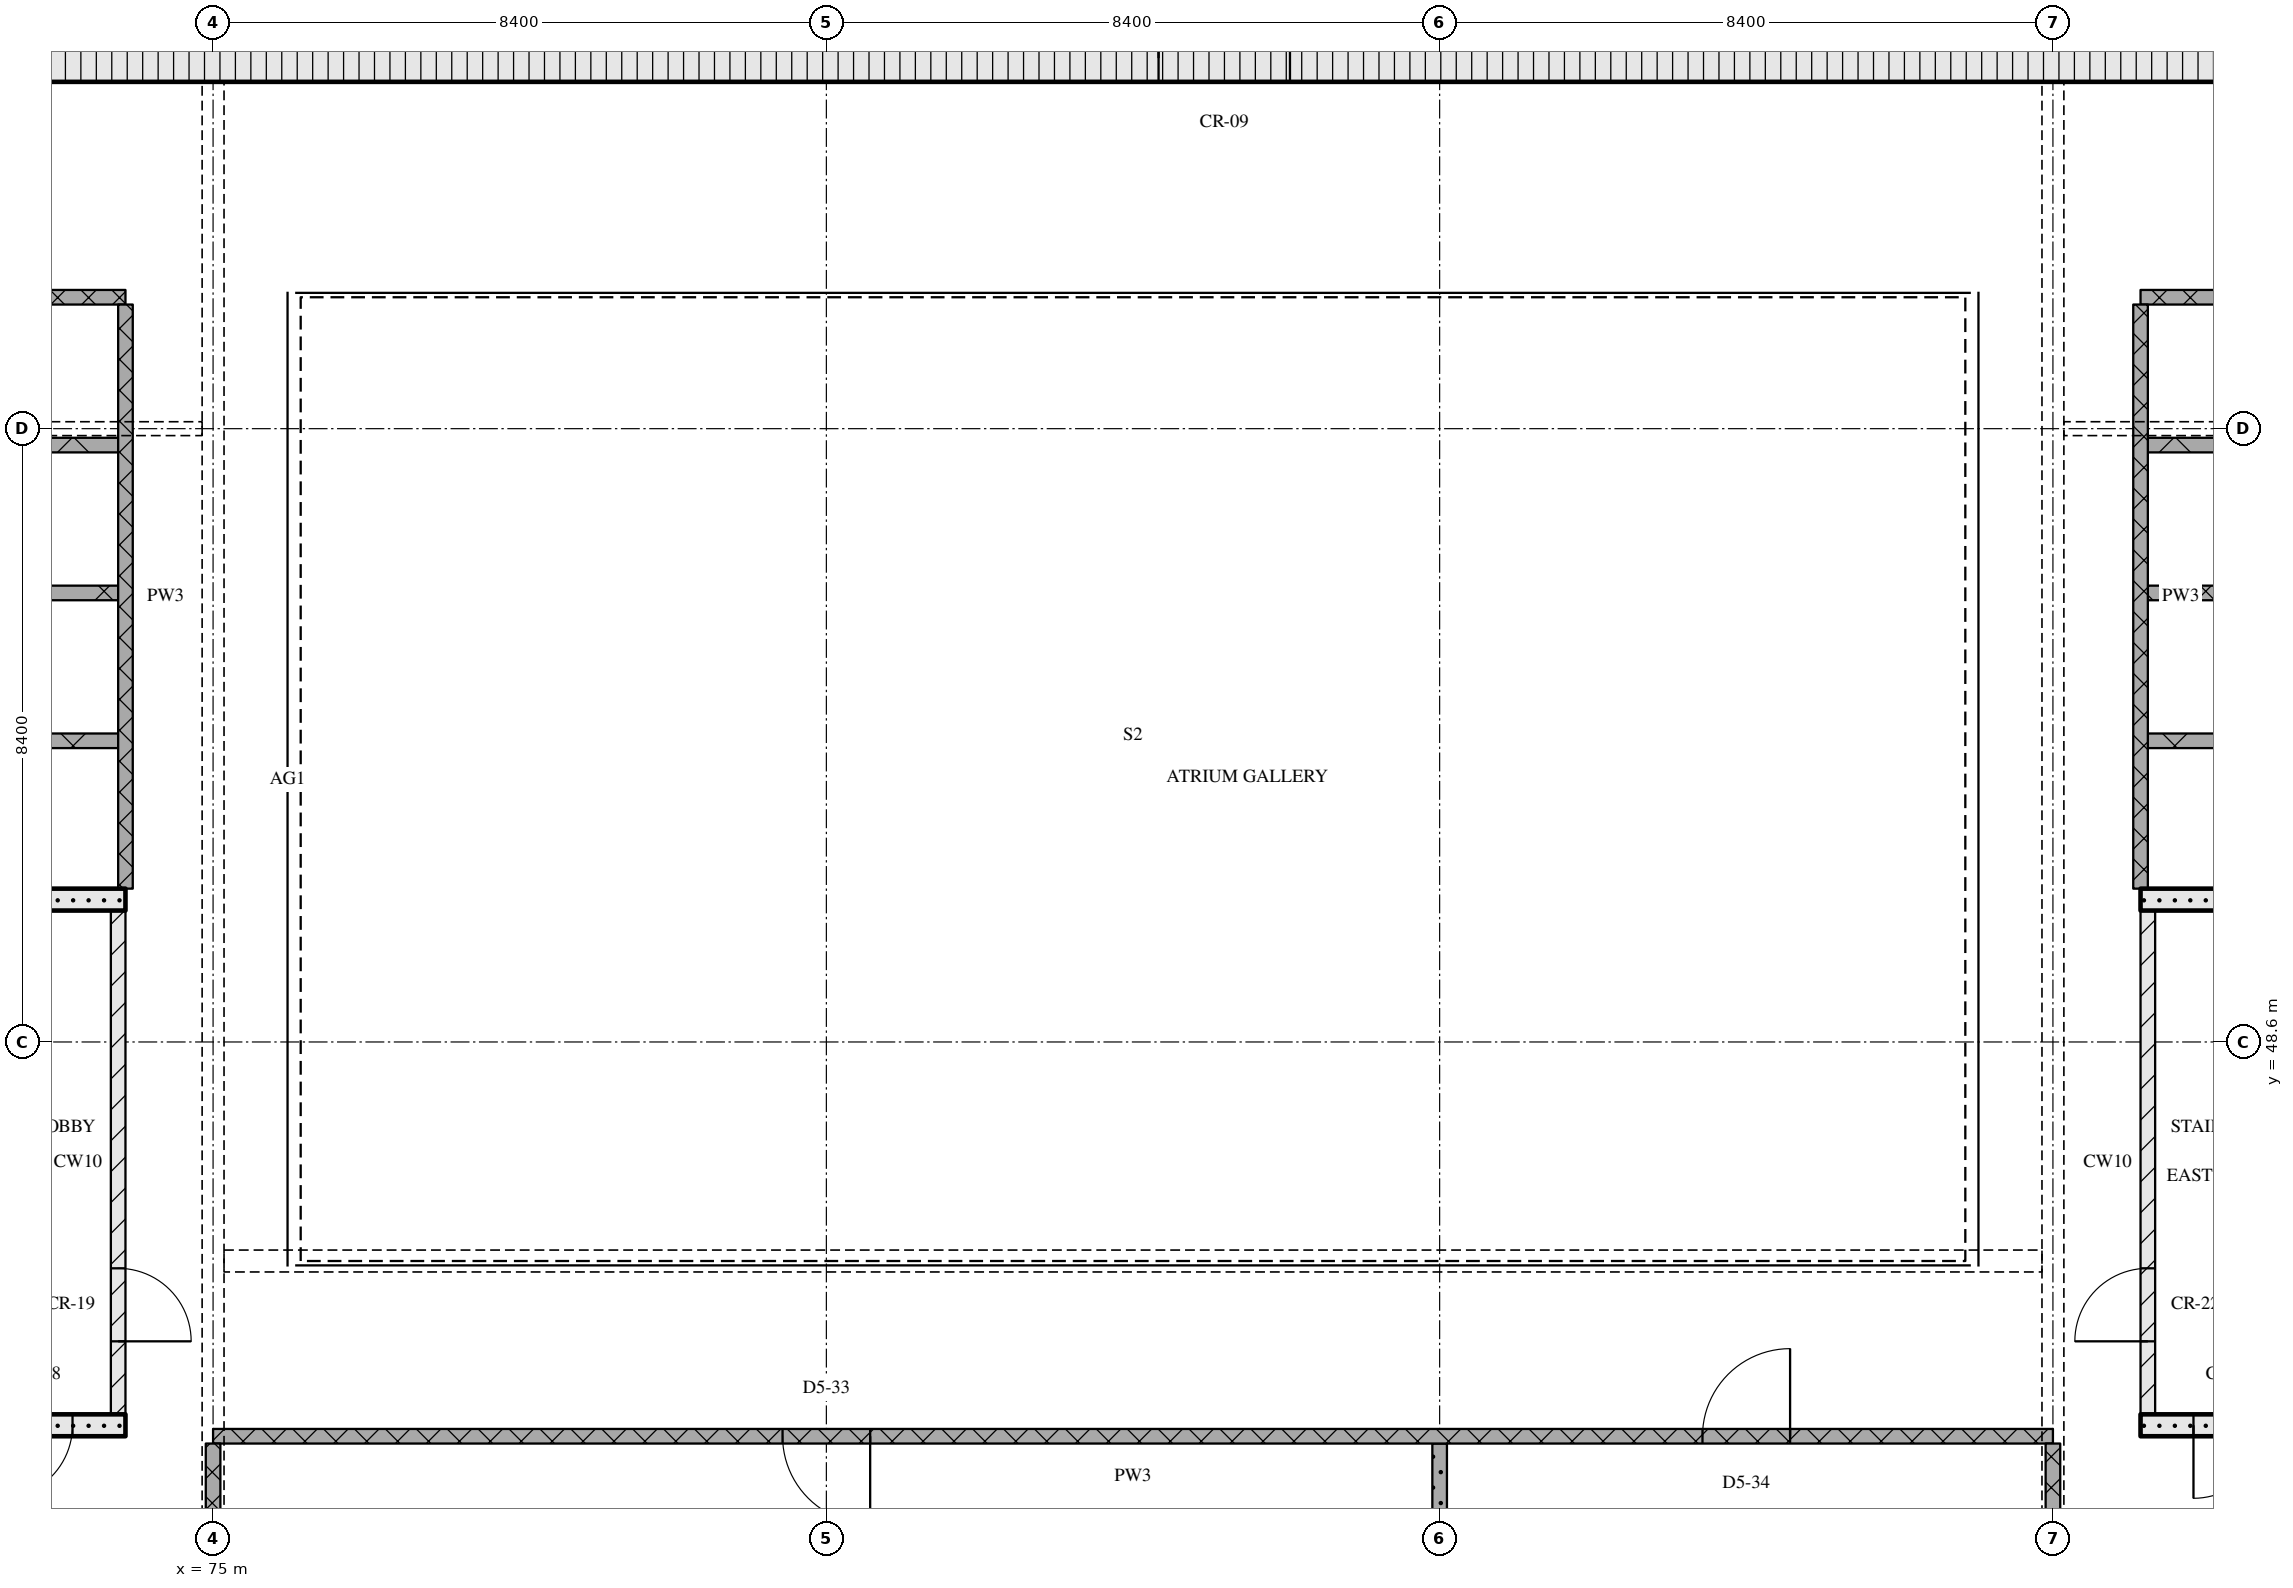
"""IFC4 building model, lengths in metres.
Left out: names, types, materials, properties, quantities, classifications, styles, units other than length and angle.
Written with IfcOpenShell. Run it as: python <this file> out.ifc"""

import sys

from ifc_helpers import new_model, si_unit, direction, frame, frame_2d, origin, place, context, subcontext, project, spatial, rectangle, extrude, element, fill, save


model = new_model("IFC4")
c1 = context("Model", 3, precision=1e-05, world=origin(), true_north=direction((0.0, 1.0)))
c2 = subcontext(c1, "Body", "Model", "MODEL_VIEW")
j1 = project(units=[si_unit("LENGTHUNIT", "METRE"), si_unit("PLANEANGLEUNIT", "RADIAN")], contexts=[c1])
p1 = place(None, origin())
s1 = spatial("IfcSite", under=j1, at=p1, CompositionType="ELEMENT")
p2 = place(p1, origin())
s2 = spatial("IfcBuilding", under=s1, at=p2, CompositionType="ELEMENT")
p3 = place(p2, frame((0.0, 0.0, 248.7)))
s3 = spatial("IfcBuildingStorey", under=s2, at=p3, CompositionType="ELEMENT", Elevation=248.7)
p4 = place(p3, frame((67.15, 62.075, 0.0), z_axis=(0.0, 0.0, 1.0), x_axis=(1.0, 0.0, 0.0)))
e1 = element("IfcWall", 1, at=p4, inside=s3, PredefinedType="SOLIDWALL", context=c2, shape_type="SweptSolid", body=[
    extrude(rectangle(XDim=40.9, YDim=0.65, at=frame_2d((20.45, 0.0))), origin(), (0.0, 0.0, 1.0), 3.3),
])
p5 = place(p4, frame((20.8, 0.0, 0.0)))
e2 = element("IfcOpeningElement", 2, at=p5, cuts=e1, PredefinedType="OPENING", context=c2, shape_type="SweptSolid", body=[
    extrude(rectangle(XDim=1.8, YDim=2.1, at=frame_2d((0.9, 1.05))), frame((0.0, 0.335, 0.0), z_axis=(0.0, -1.0, 0.0), x_axis=(1.0, 0.0, 0.0)), (0.0, 0.0, 1.0), 0.67),
])
p6 = place(p3, frame((68.2, 43.35, 0.0), z_axis=(0.0, 0.0, 1.0), x_axis=(1.0, 0.0, 0.0)))
e3 = element("IfcWall", 3, at=p6, inside=s3, PredefinedType="SOLIDWALL", context=c2, shape_type="SweptSolid", body=[
    extrude(rectangle(XDim=5.6, YDim=0.3, at=frame_2d((2.8, 0.0))), origin(), (0.0, 0.0, 1.0), 3.3),
])
p7 = place(p6, frame((3.875, 0.0, 0.0)))
e4 = element("IfcOpeningElement", 4, at=p7, cuts=e3, PredefinedType="OPENING", context=c2, shape_type="SweptSolid", body=[
    extrude(rectangle(XDim=1.0, YDim=2.1, at=frame_2d((0.5, 1.05))), frame((0.0, 0.16, 0.0), z_axis=(0.0, -1.0, 0.0), x_axis=(1.0, 0.0, 0.0)), (0.0, 0.0, 1.0), 0.32),
])
p8 = place(p3, frame((73.7, 43.5, 0.0), z_axis=(0.0, 0.0, 1.0), x_axis=(0.0, 1.0, 0.0)))
e5 = element("IfcWall", 5, at=p8, inside=s3, PredefinedType="PARTITIONING", context=c2, shape_type="SweptSolid", body=[
    extrude(rectangle(XDim=6.9, YDim=0.2, at=frame_2d((3.45, 0.0))), origin(), (0.0, 0.0, 1.0), 3.3),
])
p9 = place(p8, frame((1.0, 0.0, 0.0)))
e6 = element("IfcOpeningElement", 6, at=p9, cuts=e5, PredefinedType="OPENING", context=c2, shape_type="SweptSolid", body=[
    extrude(rectangle(XDim=1.0, YDim=2.1, at=frame_2d((0.5, 1.05))), frame((0.0, 0.11, 0.0), z_axis=(0.0, -1.0, 0.0), x_axis=(1.0, 0.0, 0.0)), (0.0, 0.0, 1.0), 0.22),
])
p10 = place(p3, frame((68.2, 50.55, 0.0), z_axis=(0.0, 0.0, 1.0), x_axis=(1.0, 0.0, 0.0)))
e7 = element("IfcWall", 7, at=p10, inside=s3, PredefinedType="SOLIDWALL", context=c2, shape_type="SweptSolid", body=[
    extrude(rectangle(XDim=5.6, YDim=0.3, at=frame_2d((2.8, 0.0))), origin(), (0.0, 0.0, 1.0), 3.3),
])
p11 = place(p3, frame((101.4, 43.35, 0.0), z_axis=(0.0, 0.0, 1.0), x_axis=(1.0, 0.0, 0.0)))
e8 = element("IfcWall", 8, at=p11, inside=s3, PredefinedType="SOLIDWALL", context=c2, shape_type="SweptSolid", body=[
    extrude(rectangle(XDim=5.6, YDim=0.3, at=frame_2d((2.8, 0.0))), origin(), (0.0, 0.0, 1.0), 3.3),
])
p12 = place(p11, frame((0.725, 0.0, 0.0)))
e9 = element("IfcOpeningElement", 9, at=p12, cuts=e8, PredefinedType="OPENING", context=c2, shape_type="SweptSolid", body=[
    extrude(rectangle(XDim=1.0, YDim=2.1, at=frame_2d((0.5, 1.05))), frame((0.0, 0.16, 0.0), z_axis=(0.0, -1.0, 0.0), x_axis=(1.0, 0.0, 0.0)), (0.0, 0.0, 1.0), 0.32),
])
p13 = place(p3, frame((101.5, 43.5, 0.0), z_axis=(0.0, 0.0, 1.0), x_axis=(0.0, 1.0, 0.0)))
e10 = element("IfcWall", 10, at=p13, inside=s3, PredefinedType="PARTITIONING", context=c2, shape_type="SweptSolid", body=[
    extrude(rectangle(XDim=6.9, YDim=0.2, at=frame_2d((3.45, 0.0))), origin(), (0.0, 0.0, 1.0), 3.3),
])
p14 = place(p13, frame((1.0, 0.0, 0.0)))
e11 = element("IfcOpeningElement", 11, at=p14, cuts=e10, PredefinedType="OPENING", context=c2, shape_type="SweptSolid", body=[
    extrude(rectangle(XDim=1.0, YDim=2.1, at=frame_2d((0.5, 1.05))), frame((0.0, 0.11, 0.0), z_axis=(0.0, -1.0, 0.0), x_axis=(1.0, 0.0, 0.0)), (0.0, 0.0, 1.0), 0.22),
])
p15 = place(p3, frame((101.4, 50.55, 0.0), z_axis=(0.0, 0.0, 1.0), x_axis=(1.0, 0.0, 0.0)))
e12 = element("IfcWall", 12, at=p15, inside=s3, PredefinedType="SOLIDWALL", context=c2, shape_type="SweptSolid", body=[
    extrude(rectangle(XDim=5.6, YDim=0.3, at=frame_2d((2.8, 0.0))), origin(), (0.0, 0.0, 1.0), 3.3),
])
p16 = place(p3, frame((100.2, 43.2, 0.0), z_axis=(0.0, 0.0, 1.0), x_axis=(-1.0, 0.0, 0.0)))
e13 = element("IfcWall", 13, at=p16, inside=s3, PredefinedType="PARTITIONING", context=c2, shape_type="SweptSolid", body=[
    extrude(rectangle(XDim=25.2, YDim=0.2, at=frame_2d((12.6, 0.0))), origin(), (0.0, 0.0, 1.0), 3.3),
])
p17 = place(p16, frame((3.6, 0.0, 0.0)))
e14 = element("IfcOpeningElement", 14, at=p17, cuts=e13, PredefinedType="OPENING", context=c2, shape_type="SweptSolid", body=[
    extrude(rectangle(XDim=1.2, YDim=2.1, at=frame_2d((0.6, 1.05))), frame((0.0, 0.11, 0.0), z_axis=(0.0, -1.0, 0.0), x_axis=(1.0, 0.0, 0.0)), (0.0, 0.0, 1.0), 0.22),
])
p18 = place(p16, frame((16.2, 0.0, 0.0)))
e15 = element("IfcOpeningElement", 15, at=p18, cuts=e13, PredefinedType="OPENING", context=c2, shape_type="SweptSolid", body=[
    extrude(rectangle(XDim=1.2, YDim=2.1, at=frame_2d((0.6, 1.05))), frame((0.0, 0.11, 0.0), z_axis=(0.0, -1.0, 0.0), x_axis=(1.0, 0.0, 0.0)), (0.0, 0.0, 1.0), 0.22),
])
p19 = place(p3, frame((63.1, 52.725, 0.0), z_axis=(0.0, 0.0, 1.0), x_axis=(1.0, 0.0, 0.0)))
e16 = element("IfcWall", 16, at=p19, inside=s3, PredefinedType="PARTITIONING", context=c2, shape_type="SweptSolid", body=[
    extrude(rectangle(XDim=10.6, YDim=0.2, at=frame_2d((5.3, 0.0))), origin(), (0.0, 0.0, 1.0), 3.3),
])
p20 = place(p3, frame((101.5, 52.725, 0.0), z_axis=(0.0, 0.0, 1.0), x_axis=(1.0, 0.0, 0.0)))
e17 = element("IfcWall", 17, at=p20, inside=s3, PredefinedType="PARTITIONING", context=c2, shape_type="SweptSolid", body=[
    extrude(rectangle(XDim=10.6, YDim=0.2, at=frame_2d((5.3, 0.0))), origin(), (0.0, 0.0, 1.0), 3.3),
])
p21 = place(p3, frame((63.1, 54.75, 0.0), z_axis=(0.0, 0.0, 1.0), x_axis=(1.0, 0.0, 0.0)))
e18 = element("IfcWall", 18, at=p21, inside=s3, PredefinedType="PARTITIONING", context=c2, shape_type="SweptSolid", body=[
    extrude(rectangle(XDim=10.6, YDim=0.2, at=frame_2d((5.3, 0.0))), origin(), (0.0, 0.0, 1.0), 3.3),
])
p22 = place(p3, frame((101.5, 54.75, 0.0), z_axis=(0.0, 0.0, 1.0), x_axis=(1.0, 0.0, 0.0)))
e19 = element("IfcWall", 19, at=p22, inside=s3, PredefinedType="PARTITIONING", context=c2, shape_type="SweptSolid", body=[
    extrude(rectangle(XDim=10.6, YDim=0.2, at=frame_2d((5.3, 0.0))), origin(), (0.0, 0.0, 1.0), 3.3),
])
for number, where, z_axis, x_axis in (
    (20, (66.92, 56.775, 0.0), (0.0, 0.0, 1.0), (1.0, 0.0, 0.0)),
    (21, (101.5, 56.775, 0.0), (0.0, 0.0, 1.0), (1.0, 0.0, 0.0)),
):
    element("IfcWall", number, at=place(p3, frame(where, z_axis=z_axis, x_axis=x_axis)), inside=s3, PredefinedType="PARTITIONING", context=c2, shape_type="SweptSolid", body=[
        extrude(rectangle(XDim=6.78, YDim=0.2, at=frame_2d((3.39, 0.0))), origin(), (0.0, 0.0, 1.0), 3.3),
    ])
p23 = place(p3, frame((73.8, 58.8, 0.0), z_axis=(0.0, 0.0, 1.0), x_axis=(-1.0, 0.0, 0.0)))
e22 = element("IfcWall", 22, at=p23, inside=s3, PredefinedType="PARTITIONING", context=c2, shape_type="SweptSolid", body=[
    extrude(rectangle(XDim=10.8, YDim=0.2, at=frame_2d((5.4, 0.0))), origin(), (0.0, 0.0, 1.0), 3.3),
])
p24 = place(p23, frame((4.95, 0.0, 0.0)))
e23 = element("IfcOpeningElement", 23, at=p24, cuts=e22, PredefinedType="OPENING", context=c2, shape_type="SweptSolid", body=[
    extrude(rectangle(XDim=0.9, YDim=2.1, at=frame_2d((0.45, 1.05))), frame((0.0, 0.11, 0.0), z_axis=(0.0, -1.0, 0.0), x_axis=(1.0, 0.0, 0.0)), (0.0, 0.0, 1.0), 0.22),
])
p25 = place(p3, frame((101.4, 58.8, 0.0), z_axis=(0.0, 0.0, 1.0), x_axis=(1.0, 0.0, 0.0)))
e24 = element("IfcWall", 24, at=p25, inside=s3, PredefinedType="PARTITIONING", context=c2, shape_type="SweptSolid", body=[
    extrude(rectangle(XDim=10.8, YDim=0.2, at=frame_2d((5.4, 0.0))), origin(), (0.0, 0.0, 1.0), 3.3),
])
p26 = place(p3, frame((73.8, 58.7, 0.0), z_axis=(0.0, 0.0, 1.0), x_axis=(0.0, -1.0, 0.0)))
e25 = element("IfcWall", 25, at=p26, inside=s3, PredefinedType="PARTITIONING", context=c2, shape_type="SweptSolid", body=[
    extrude(rectangle(XDim=8.0, YDim=0.2, at=frame_2d((4.0, 0.0))), origin(), (0.0, 0.0, 1.0), 3.3),
])
p27 = place(p3, frame((75.0, 43.1, 0.0), z_axis=(0.0, 0.0, 1.0), x_axis=(0.0, -1.0, 0.0)))
e26 = element("IfcWall", 26, at=p27, inside=s3, PredefinedType="PARTITIONING", context=c2, shape_type="SweptSolid", body=[
    extrude(rectangle(XDim=2.2, YDim=0.2, at=frame_2d((1.1, 0.0))), origin(), (0.0, 0.0, 1.0), 2.51),
])
p28 = place(p3, frame((91.8, 43.1, 0.0), z_axis=(0.0, 0.0, 1.0), x_axis=(0.0, -1.0, 0.0)))
e27 = element("IfcWall", 27, at=p28, inside=s3, PredefinedType="PARTITIONING", context=c2, shape_type="SweptSolid", body=[
    extrude(rectangle(XDim=2.58, YDim=0.2, at=frame_2d((1.29, 0.0))), origin(), (0.0, 0.0, 1.0), 3.3),
])
p29 = place(p3, frame((100.2, 43.1, 0.0), z_axis=(0.0, 0.0, 1.0), x_axis=(0.0, -1.0, 0.0)))
e28 = element("IfcWall", 28, at=p29, inside=s3, PredefinedType="PARTITIONING", context=c2, shape_type="SweptSolid", body=[
    extrude(rectangle(XDim=2.2, YDim=0.2, at=frame_2d((1.1, 0.0))), origin(), (0.0, 0.0, 1.0), 2.51),
])
p30 = place(p3, frame((101.4, 58.7, 0.0), z_axis=(0.0, 0.0, 1.0), x_axis=(0.0, -1.0, 0.0)))
e29 = element("IfcWall", 29, at=p30, inside=s3, PredefinedType="PARTITIONING", context=c2, shape_type="SweptSolid", body=[
    extrude(rectangle(XDim=8.0, YDim=0.2, at=frame_2d((4.0, 0.0))), origin(), (0.0, 0.0, 1.0), 3.3),
])
p31 = place(p5, origin())
e30 = element("IfcDoor", 30, at=p31, inside=s3, OperationType="DOUBLE_DOOR_SINGLE_SWING", PredefinedType="DOOR", context=c2, shape_type="SweptSolid", body=[
    extrude(rectangle(XDim=1.8, YDim=2.1, at=frame_2d((0.9, 1.05))), frame((0.0, 0.025, 0.0), z_axis=(0.0, -1.0, 0.0), x_axis=(1.0, 0.0, 0.0)), (0.0, 0.0, 1.0), 0.05),
])
fill(e2, e30)
p32 = place(p7, origin())
e31 = element("IfcDoor", 31, at=p32, inside=s3, OperationType="SINGLE_SWING_RIGHT", PredefinedType="DOOR", context=c2, shape_type="SweptSolid", body=[
    extrude(rectangle(XDim=1.0, YDim=2.1, at=frame_2d((0.5, 1.05))), frame((0.0, 0.025, 0.0), z_axis=(0.0, -1.0, 0.0), x_axis=(1.0, 0.0, 0.0)), (0.0, 0.0, 1.0), 0.05),
])
fill(e4, e31)
p33 = place(p9, origin())
e32 = element("IfcDoor", 32, at=p33, inside=s3, OperationType="SINGLE_SWING_RIGHT", PredefinedType="DOOR", context=c2, shape_type="SweptSolid", body=[
    extrude(rectangle(XDim=1.0, YDim=2.1, at=frame_2d((0.5, 1.05))), frame((0.0, 0.025, 0.0), z_axis=(0.0, -1.0, 0.0), x_axis=(1.0, 0.0, 0.0)), (0.0, 0.0, 1.0), 0.05),
])
fill(e6, e32)
p34 = place(p12, origin())
e33 = element("IfcDoor", 33, at=p34, inside=s3, OperationType="SINGLE_SWING_RIGHT", PredefinedType="DOOR", context=c2, shape_type="SweptSolid", body=[
    extrude(rectangle(XDim=1.0, YDim=2.1, at=frame_2d((0.5, 1.05))), frame((0.0, 0.025, 0.0), z_axis=(0.0, -1.0, 0.0), x_axis=(1.0, 0.0, 0.0)), (0.0, 0.0, 1.0), 0.05),
])
fill(e9, e33)
p35 = place(p14, origin())
e34 = element("IfcDoor", 34, at=p35, inside=s3, OperationType="SINGLE_SWING_LEFT", PredefinedType="DOOR", context=c2, shape_type="SweptSolid", body=[
    extrude(rectangle(XDim=1.0, YDim=2.1, at=frame_2d((0.5, 1.05))), frame((0.0, 0.025, 0.0), z_axis=(0.0, -1.0, 0.0), x_axis=(1.0, 0.0, 0.0)), (0.0, 0.0, 1.0), 0.05),
])
fill(e11, e34)
p36 = place(p17, origin())
e35 = element("IfcDoor", 35, at=p36, inside=s3, OperationType="SINGLE_SWING_RIGHT", PredefinedType="DOOR", context=c2, shape_type="SweptSolid", body=[
    extrude(rectangle(XDim=1.2, YDim=2.1, at=frame_2d((0.6, 1.05))), frame((0.0, 0.025, 0.0), z_axis=(0.0, -1.0, 0.0), x_axis=(1.0, 0.0, 0.0)), (0.0, 0.0, 1.0), 0.05),
])
fill(e14, e35)
p37 = place(p18, origin())
e36 = element("IfcDoor", 36, at=p37, inside=s3, OperationType="SINGLE_SWING_LEFT", PredefinedType="DOOR", context=c2, shape_type="SweptSolid", body=[
    extrude(rectangle(XDim=1.2, YDim=2.1, at=frame_2d((0.6, 1.05))), frame((0.0, 0.025, 0.0), z_axis=(0.0, -1.0, 0.0), x_axis=(1.0, 0.0, 0.0)), (0.0, 0.0, 1.0), 0.05),
])
fill(e15, e36)
save(model, sys.argv[1])
